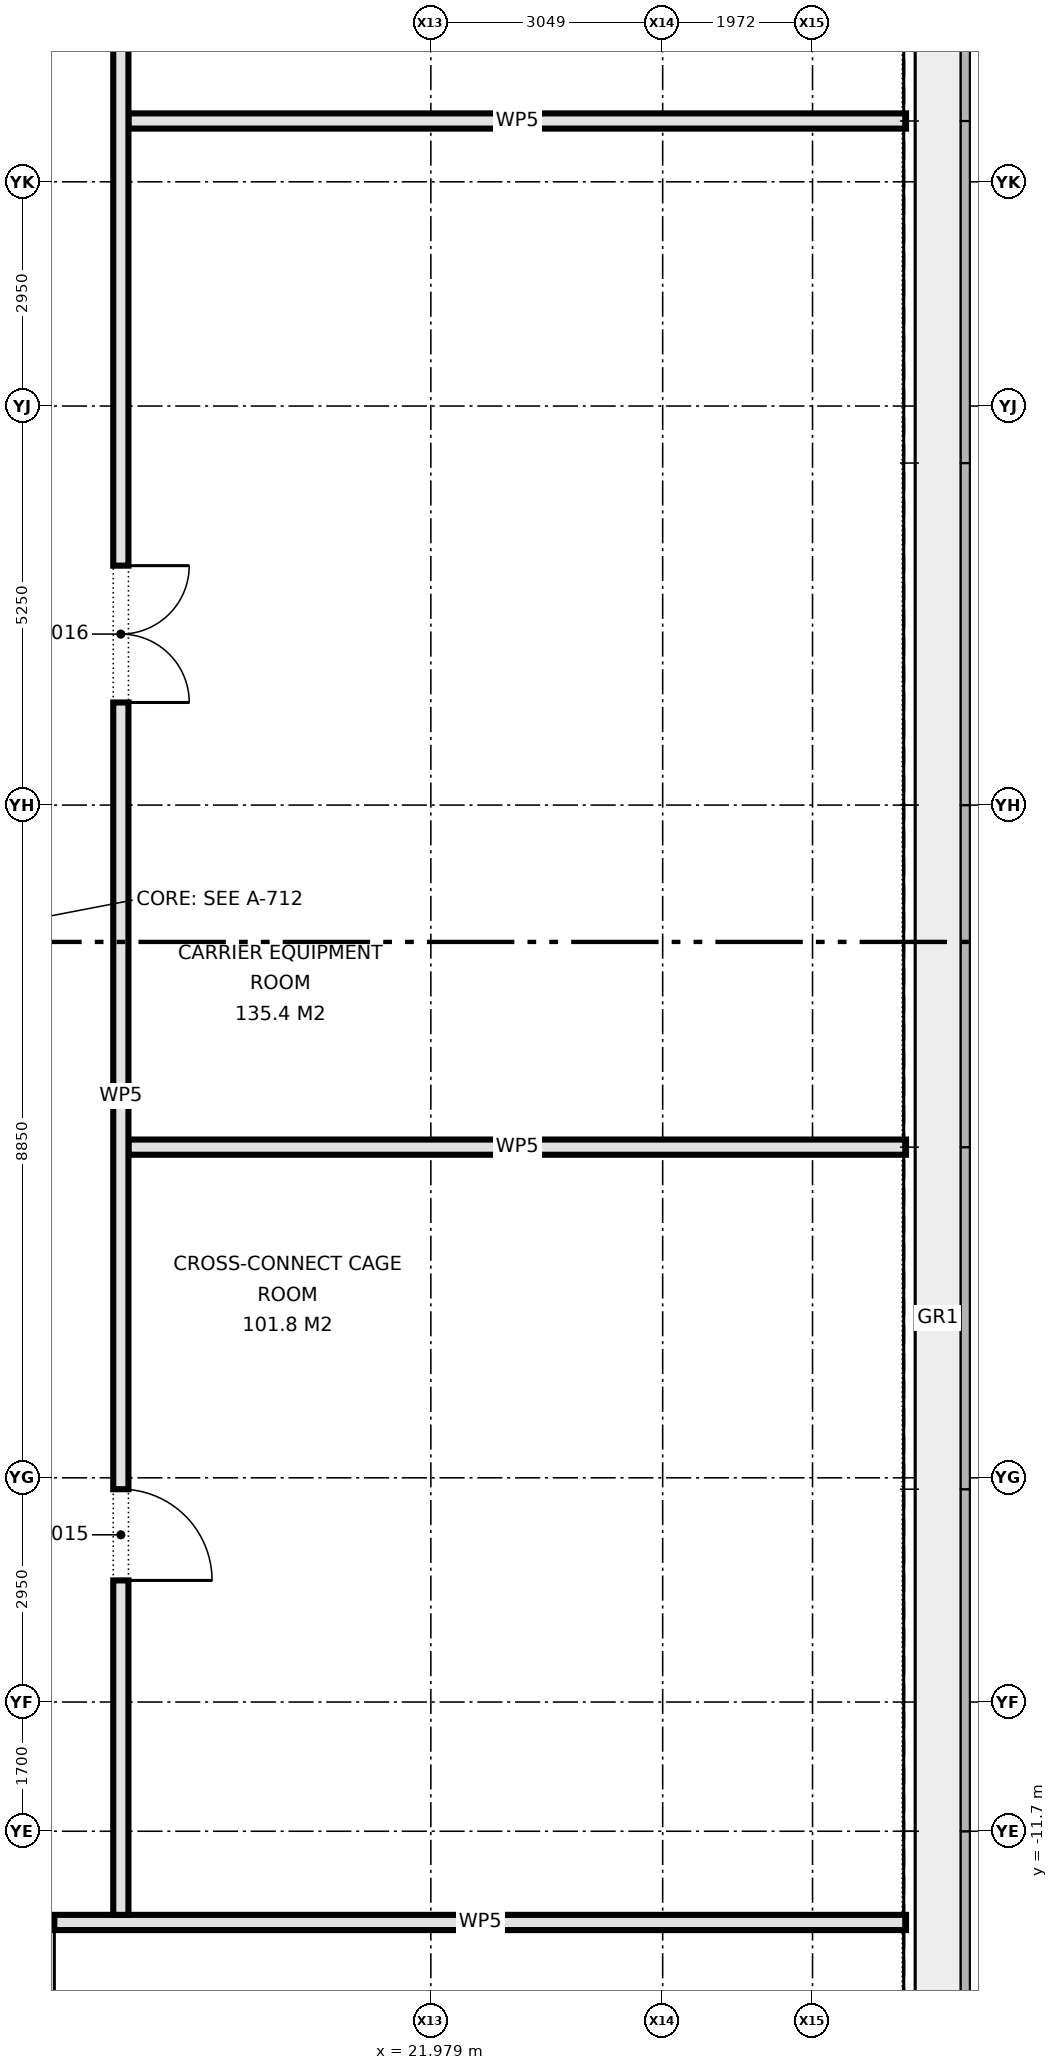
"""IFC4 building model, lengths in metres.
Left out: names, types, materials, properties, quantities, classifications, styles, units other than length and angle.
Written with IfcOpenShell. Run it as: python <this file> out.ifc"""

import sys

from ifc_helpers import new_model, si_unit, direction, frame, frame_2d, origin, place, context, subcontext, project, spatial, rectangle, extrude, element, fill, save


model = new_model("IFC4")
c1 = context("Model", 3, precision=1e-05, world=origin(), true_north=direction((0.0, 1.0)))
c2 = subcontext(c1, "Body", "Model", "MODEL_VIEW")
j1 = project(units=[si_unit("LENGTHUNIT", "METRE"), si_unit("PLANEANGLEUNIT", "RADIAN")], contexts=[c1])
p1 = place(None, origin())
s1 = spatial("IfcSite", under=j1, at=p1, CompositionType="ELEMENT")
p2 = place(p1, origin())
s2 = spatial("IfcBuilding", under=s1, at=p2, CompositionType="ELEMENT")
p3 = place(p2, frame((0.0, 0.0, 82.0)))
s3 = spatial("IfcBuildingStorey", under=s2, at=p3, CompositionType="ELEMENT", Elevation=82.0)
p4 = place(p3, frame((-20.33, -12.9, 0.0), z_axis=(0.0, 0.0, 1.0), x_axis=(1.0, 0.0, 0.0)))
e1 = element("IfcWall", 1, at=p4, inside=s3, PredefinedType="PARTITIONING", context=c2, shape_type="SweptSolid", body=[
    extrude(rectangle(XDim=48.56, YDim=0.2, at=frame_2d((24.28, 0.0))), origin(), (0.0, 0.0, 1.0), 4.2),
])
p5 = place(p4, frame((3.39, 0.0, 0.0)))
e2 = element("IfcOpeningElement", 2, at=p5, cuts=e1, PredefinedType="OPENING", context=c2, shape_type="SweptSolid", body=[
    extrude(rectangle(XDim=1.8, YDim=2.1, at=frame_2d((0.9, 1.05))), frame((0.0, 0.11, 0.0), z_axis=(0.0, -1.0, 0.0), x_axis=(1.0, 0.0, 0.0)), (0.0, 0.0, 1.0), 0.22),
])
p6 = place(p4, frame((15.83, 0.0, 0.0)))
e3 = element("IfcOpeningElement", 3, at=p6, cuts=e1, PredefinedType="OPENING", context=c2, shape_type="SweptSolid", body=[
    extrude(rectangle(XDim=1.8, YDim=2.1, at=frame_2d((0.9, 1.05))), frame((0.0, 0.11, 0.0), z_axis=(0.0, -1.0, 0.0), x_axis=(1.0, 0.0, 0.0)), (0.0, 0.0, 1.0), 0.22),
])
p7 = place(p4, frame((9.38, 0.0, 0.0)))
e4 = element("IfcOpeningElement", 4, at=p7, cuts=e1, PredefinedType="OPENING", context=c2, shape_type="SweptSolid", body=[
    extrude(rectangle(XDim=1.2, YDim=2.1, at=frame_2d((0.6, 1.05))), frame((0.0, 0.11, 0.0), z_axis=(0.0, -1.0, 0.0), x_axis=(1.0, 0.0, 0.0)), (0.0, 0.0, 1.0), 0.22),
])
p8 = place(p4, frame((32.15, 0.0, 0.0)))
e5 = element("IfcOpeningElement", 5, at=p8, cuts=e1, PredefinedType="OPENING", context=c2, shape_type="SweptSolid", body=[
    extrude(rectangle(XDim=1.2, YDim=2.1, at=frame_2d((0.6, 1.05))), frame((0.0, 0.11, 0.0), z_axis=(0.0, -1.0, 0.0), x_axis=(1.0, 0.0, 0.0)), (0.0, 0.0, 1.0), 0.22),
])
p9 = place(p4, frame((36.155, 0.0, 0.0)))
e6 = element("IfcOpeningElement", 6, at=p9, cuts=e1, PredefinedType="OPENING", context=c2, shape_type="SweptSolid", body=[
    extrude(rectangle(XDim=1.2, YDim=2.1, at=frame_2d((0.6, 1.05))), frame((0.0, 0.11, 0.0), z_axis=(0.0, -1.0, 0.0), x_axis=(1.0, 0.0, 0.0)), (0.0, 0.0, 1.0), 0.22),
])
p10 = place(p4, frame((23.03, 0.0, 0.0)))
e7 = element("IfcOpeningElement", 7, at=p10, cuts=e1, PredefinedType="OPENING", context=c2, shape_type="SweptSolid", body=[
    extrude(rectangle(XDim=1.0, YDim=2.1, at=frame_2d((0.5, 1.05))), frame((0.0, 0.11, 0.0), z_axis=(0.0, -1.0, 0.0), x_axis=(1.0, 0.0, 0.0)), (0.0, 0.0, 1.0), 0.22),
])
p11 = place(p4, frame((26.03, 0.0, 0.0)))
e8 = element("IfcOpeningElement", 8, at=p11, cuts=e1, PredefinedType="OPENING", context=c2, shape_type="SweptSolid", body=[
    extrude(rectangle(XDim=1.0, YDim=2.1, at=frame_2d((0.5, 1.05))), frame((0.0, 0.11, 0.0), z_axis=(0.0, -1.0, 0.0), x_axis=(1.0, 0.0, 0.0)), (0.0, 0.0, 1.0), 0.22),
])
p12 = place(p4, frame((28.63, 0.0, 0.0)))
e9 = element("IfcOpeningElement", 9, at=p12, cuts=e1, PredefinedType="OPENING", context=c2, shape_type="SweptSolid", body=[
    extrude(rectangle(XDim=1.0, YDim=2.1, at=frame_2d((0.5, 1.05))), frame((0.0, 0.11, 0.0), z_axis=(0.0, -1.0, 0.0), x_axis=(1.0, 0.0, 0.0)), (0.0, 0.0, 1.0), 0.22),
])
for number, where, z_axis, x_axis in (
    (10, (18.0, -2.7, 0.0), (0.0, 0.0, 1.0), (1.0, 0.0, 0.0)),
    (11, (18.0, 10.8, 0.0), (0.0, 0.0, 1.0), (1.0, 0.0, 0.0)),
):
    element("IfcWall", number, at=place(p3, frame(where, z_axis=z_axis, x_axis=x_axis)), inside=s3, PredefinedType="PARTITIONING", context=c2, shape_type="SweptSolid", body=[
        extrude(rectangle(XDim=10.23, YDim=0.2, at=frame_2d((5.115, 0.0))), origin(), (0.0, 0.0, 1.0), 4.2),
    ])
p13 = place(p3, frame((17.9, -12.8, 0.0), z_axis=(0.0, 0.0, 1.0), x_axis=(0.0, 1.0, 0.0)))
e12 = element("IfcWall", 12, at=p13, inside=s3, PredefinedType="PARTITIONING", context=c2, shape_type="SweptSolid", body=[
    extrude(rectangle(XDim=25.6, YDim=0.2, at=frame_2d((12.8, 0.0))), origin(), (0.0, 0.0, 1.0), 4.2),
])
p14 = place(p13, frame((4.4, 0.0, 0.0)))
e13 = element("IfcOpeningElement", 13, at=p14, cuts=e12, PredefinedType="OPENING", context=c2, shape_type="SweptSolid", body=[
    extrude(rectangle(XDim=1.2, YDim=2.1, at=frame_2d((0.6, 1.05))), frame((0.0, 0.11, 0.0), z_axis=(0.0, -1.0, 0.0), x_axis=(1.0, 0.0, 0.0)), (0.0, 0.0, 1.0), 0.22),
])
p15 = place(p13, frame((15.95, 0.0, 0.0)))
e14 = element("IfcOpeningElement", 14, at=p15, cuts=e12, PredefinedType="OPENING", context=c2, shape_type="SweptSolid", body=[
    extrude(rectangle(XDim=1.8, YDim=2.1, at=frame_2d((0.9, 1.05))), frame((0.0, 0.11, 0.0), z_axis=(0.0, -1.0, 0.0), x_axis=(1.0, 0.0, 0.0)), (0.0, 0.0, 1.0), 0.22),
])
p16 = place(p9, frame((1.2, 0.0, 0.0), z_axis=(0.0, 0.0, 1.0), x_axis=(-1.0, 0.0, 0.0)))
e15 = element("IfcDoor", 15, at=p16, inside=s3, OperationType="SINGLE_SWING_LEFT", PredefinedType="DOOR", context=c2, shape_type="SweptSolid", body=[
    extrude(rectangle(XDim=1.2, YDim=2.1, at=frame_2d((0.6, 1.05))), frame((0.0, 0.025, 0.0), z_axis=(0.0, -1.0, 0.0), x_axis=(1.0, 0.0, 0.0)), (0.0, 0.0, 1.0), 0.05),
])
fill(e6, e15)
p17 = place(p14, frame((1.2, 0.0, 0.0), z_axis=(0.0, 0.0, 1.0), x_axis=(-1.0, 0.0, 0.0)))
e16 = element("IfcDoor", 16, at=p17, inside=s3, OperationType="SINGLE_SWING_RIGHT", PredefinedType="DOOR", context=c2, shape_type="SweptSolid", body=[
    extrude(rectangle(XDim=1.2, YDim=2.1, at=frame_2d((0.6, 1.05))), frame((0.0, 0.025, 0.0), z_axis=(0.0, -1.0, 0.0), x_axis=(1.0, 0.0, 0.0)), (0.0, 0.0, 1.0), 0.05),
])
fill(e13, e16)
p18 = place(p15, frame((1.8, 0.0, 0.0), z_axis=(0.0, 0.0, 1.0), x_axis=(-1.0, 0.0, 0.0)))
e17 = element("IfcDoor", 17, at=p18, inside=s3, OperationType="DOUBLE_DOOR_SINGLE_SWING", PredefinedType="DOOR", context=c2, shape_type="SweptSolid", body=[
    extrude(rectangle(XDim=1.8, YDim=2.1, at=frame_2d((0.9, 1.05))), frame((0.0, 0.025, 0.0), z_axis=(0.0, -1.0, 0.0), x_axis=(1.0, 0.0, 0.0)), (0.0, 0.0, 1.0), 0.05),
])
fill(e14, e17)
save(model, sys.argv[1])
